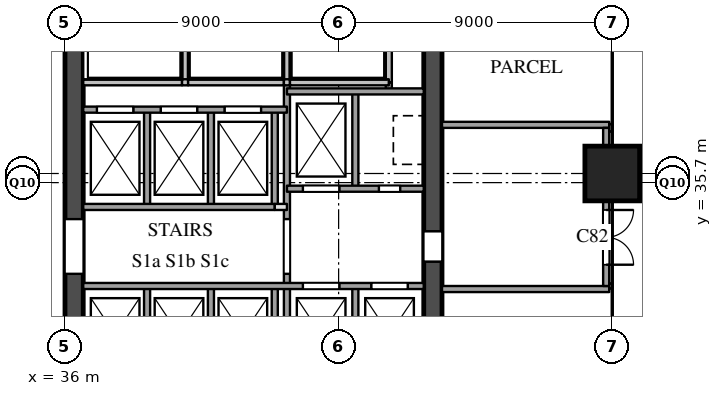
"""IFC4 building model, lengths in metres.
Left out: names, types, materials, properties, quantities, classifications, styles, units other than length and angle.
Written with IfcOpenShell. Run it as: python <this file> out.ifc"""

import sys

from ifc_helpers import new_model, si_unit, direction, frame, frame_2d, origin, origin_2d, place, context, subcontext, project, spatial, rectangle, extrude, element, fill, save


model = new_model("IFC4")
c1 = context("Model", 3, precision=1e-05, world=origin(), true_north=direction((0.0, 1.0)))
c2 = subcontext(c1, "Body", "Model", "MODEL_VIEW")
j1 = project(units=[si_unit("LENGTHUNIT", "METRE"), si_unit("PLANEANGLEUNIT", "RADIAN")], contexts=[c1])
p1 = place(None, origin())
s1 = spatial("IfcSite", under=j1, at=p1, CompositionType="ELEMENT")
p2 = place(p1, origin())
s2 = spatial("IfcBuilding", under=s1, at=p2, CompositionType="ELEMENT")
p3 = place(p2, origin())
s3 = spatial("IfcBuildingStorey", under=s2, at=p3, CompositionType="ELEMENT", Elevation=0.0)
p4 = place(p3, frame((54.0, 36.0, 0.0), z_axis=(0.0, 0.0, 1.0), x_axis=(1.0, 0.0, 0.0)))
e1 = element("IfcColumn", 1, at=p4, inside=s3, PredefinedType="COLUMN", context=c2, shape_type="SweptSolid", body=[
    extrude(rectangle(XDim=1.8, YDim=1.8, at=origin_2d()), origin(), (0.0, 0.0, 1.0), 8.0),
])
p5 = place(p3, frame((36.3, 29.1, 0.0), z_axis=(0.0, 0.0, 1.0), x_axis=(0.0, 1.0, 0.0)))
e2 = element("IfcWall", 2, at=p5, inside=s3, PredefinedType="SHEAR", context=c2, shape_type="SweptSolid", body=[
    extrude(rectangle(XDim=20.3, YDim=0.6, at=frame_2d((10.15, 0.0))), origin(), (0.0, 0.0, 1.0), 7.59),
])
p6 = place(p5, frame((3.6, 0.0, 0.0)))
e3 = element("IfcOpeningElement", 3, at=p6, cuts=e2, PredefinedType="OPENING", context=c2, shape_type="SweptSolid", body=[
    extrude(rectangle(XDim=1.8, YDim=2.1, at=frame_2d((0.9, 1.05))), frame((0.0, 0.31, 0.0), z_axis=(0.0, -1.0, 0.0), x_axis=(1.0, 0.0, 0.0)), (0.0, 0.0, 1.0), 0.62),
])
p7 = place(p5, frame((16.15, 0.0, 0.0)))
e4 = element("IfcOpeningElement", 4, at=p7, cuts=e2, PredefinedType="OPENING", context=c2, shape_type="SweptSolid", body=[
    extrude(rectangle(XDim=1.8, YDim=2.4, at=frame_2d((0.9, 1.2))), frame((0.0, 0.31, 0.0), z_axis=(0.0, -1.0, 0.0), x_axis=(1.0, 0.0, 0.0)), (0.0, 0.0, 1.0), 0.62),
])
p8 = place(p5, frame((18.05, 0.0, 0.0)))
e5 = element("IfcOpeningElement", 5, at=p8, cuts=e2, PredefinedType="OPENING", context=c2, shape_type="SweptSolid", body=[
    extrude(rectangle(XDim=1.8, YDim=2.4, at=frame_2d((0.9, 1.2))), frame((0.0, 0.31, 0.0), z_axis=(0.0, -1.0, 0.0), x_axis=(1.0, 0.0, 0.0)), (0.0, 0.0, 1.0), 0.62),
])
p9 = place(p3, frame((48.1, 29.1, 0.0), z_axis=(0.0, 0.0, 1.0), x_axis=(0.0, 1.0, 0.0)))
e6 = element("IfcWall", 6, at=p9, inside=s3, PredefinedType="SHEAR", context=c2, shape_type="SweptSolid", body=[
    extrude(rectangle(XDim=20.3, YDim=0.6, at=frame_2d((10.15, 0.0))), origin(), (0.0, 0.0, 1.0), 7.59),
])
p10 = place(p9, frame((12.5, 0.0, 0.0)))
e7 = element("IfcOpeningElement", 7, at=p10, cuts=e6, PredefinedType="OPENING", context=c2, shape_type="SweptSolid", body=[
    extrude(rectangle(XDim=0.7, YDim=2.1, at=frame_2d((0.35, 1.05))), frame((0.0, 0.31, 0.0), z_axis=(0.0, -1.0, 0.0), x_axis=(1.0, 0.0, 0.0)), (0.0, 0.0, 1.0), 0.62),
])
p11 = place(p9, frame((4.0, 0.0, 0.0)))
e8 = element("IfcOpeningElement", 8, at=p11, cuts=e6, PredefinedType="OPENING", context=c2, shape_type="SweptSolid", body=[
    extrude(rectangle(XDim=1.0, YDim=2.1, at=frame_2d((0.5, 1.05))), frame((0.0, 0.31, 0.0), z_axis=(0.0, -1.0, 0.0), x_axis=(1.0, 0.0, 0.0)), (0.0, 0.0, 1.0), 0.62),
])
p12 = place(p3, frame((38.7, 29.1, 0.0), z_axis=(0.0, 0.0, 1.0), x_axis=(0.0, 1.0, 0.0)))
e9 = element("IfcWall", 9, at=p12, inside=s3, PredefinedType="SOLIDWALL", context=c2, shape_type="SweptSolid", body=[
    extrude(rectangle(XDim=3.2, YDim=0.2, at=frame_2d((1.6, 0.0))), origin(), (0.0, 0.0, 1.0), 7.59),
])
p13 = place(p3, frame((38.7, 34.9, 0.0), z_axis=(0.0, 0.0, 1.0), x_axis=(0.0, 1.0, 0.0)))
e10 = element("IfcWall", 10, at=p13, inside=s3, PredefinedType="SOLIDWALL", context=c2, shape_type="SweptSolid", body=[
    extrude(rectangle(XDim=3.2, YDim=0.2, at=frame_2d((1.6, 0.0))), origin(), (0.0, 0.0, 1.0), 7.59),
])
p14 = place(p3, frame((39.95, 39.0, 0.0), z_axis=(0.0, 0.0, 1.0), x_axis=(0.0, 1.0, 0.0)))
e11 = element("IfcWall", 11, at=p14, inside=s3, PredefinedType="SOLIDWALL", context=c2, shape_type="SweptSolid", body=[
    extrude(rectangle(XDim=2.06, YDim=0.2, at=frame_2d((1.03, 0.0))), origin(), (0.0, 0.0, 1.0), 7.59),
])
p15 = place(p3, frame((40.8, 29.1, 0.0), z_axis=(0.0, 0.0, 1.0), x_axis=(0.0, 1.0, 0.0)))
e12 = element("IfcWall", 12, at=p15, inside=s3, PredefinedType="SOLIDWALL", context=c2, shape_type="SweptSolid", body=[
    extrude(rectangle(XDim=3.2, YDim=0.2, at=frame_2d((1.6, 0.0))), origin(), (0.0, 0.0, 1.0), 7.59),
])
p16 = place(p3, frame((40.8, 34.9, 0.0), z_axis=(0.0, 0.0, 1.0), x_axis=(0.0, 1.0, 0.0)))
e13 = element("IfcWall", 13, at=p16, inside=s3, PredefinedType="SOLIDWALL", context=c2, shape_type="SweptSolid", body=[
    extrude(rectangle(XDim=3.2, YDim=0.2, at=frame_2d((1.6, 0.0))), origin(), (0.0, 0.0, 1.0), 7.59),
])
p17 = place(p3, frame((42.9, 29.1, 0.0), z_axis=(0.0, 0.0, 1.0), x_axis=(0.0, 1.0, 0.0)))
e14 = element("IfcWall", 14, at=p17, inside=s3, PredefinedType="SOLIDWALL", context=c2, shape_type="SweptSolid", body=[
    extrude(rectangle(XDim=3.2, YDim=0.2, at=frame_2d((1.6, 0.0))), origin(), (0.0, 0.0, 1.0), 7.59),
])
p18 = place(p3, frame((42.9, 34.9, 0.0), z_axis=(0.0, 0.0, 1.0), x_axis=(0.0, 1.0, 0.0)))
e15 = element("IfcWall", 15, at=p18, inside=s3, PredefinedType="SOLIDWALL", context=c2, shape_type="SweptSolid", body=[
    extrude(rectangle(XDim=3.2, YDim=0.2, at=frame_2d((1.6, 0.0))), origin(), (0.0, 0.0, 1.0), 7.59),
])
p19 = place(p3, frame((43.3, 29.1, 0.0), z_axis=(0.0, 0.0, 1.0), x_axis=(0.0, 1.0, 0.0)))
e16 = element("IfcWall", 16, at=p19, inside=s3, PredefinedType="SOLIDWALL", context=c2, shape_type="SweptSolid", body=[
    extrude(rectangle(XDim=9.9, YDim=0.2, at=frame_2d((4.95, 0.0))), origin(), (0.0, 0.0, 1.0), 7.59),
])
p20 = place(p19, frame((3.6, 0.0, 0.0)))
e17 = element("IfcOpeningElement", 17, at=p20, cuts=e16, PredefinedType="OPENING", context=c2, shape_type="SweptSolid", body=[
    extrude(rectangle(XDim=1.8, YDim=2.1, at=frame_2d((0.9, 1.05))), frame((0.0, 0.11, 0.0), z_axis=(0.0, -1.0, 0.0), x_axis=(1.0, 0.0, 0.0)), (0.0, 0.0, 1.0), 0.22),
])
p21 = place(p3, frame((43.3, 39.0, 0.0), z_axis=(0.0, 0.0, 1.0), x_axis=(0.0, 1.0, 0.0)))
e18 = element("IfcWall", 18, at=p21, inside=s3, PredefinedType="SOLIDWALL", context=c2, shape_type="SweptSolid", body=[
    extrude(rectangle(XDim=2.06, YDim=0.2, at=frame_2d((1.03, 0.0))), origin(), (0.0, 0.0, 1.0), 7.59),
])
for number, where, z_axis, x_axis in (
    (19, (45.55, 29.1, 0.0), (0.0, 0.0, 1.0), (0.0, 1.0, 0.0)),
    (20, (45.55, 35.5, 0.0), (0.0, 0.0, 1.0), (0.0, 1.0, 0.0)),
):
    element("IfcWall", number, at=place(p3, frame(where, z_axis=z_axis, x_axis=x_axis)), inside=s3, PredefinedType="SOLIDWALL", context=c2, shape_type="SweptSolid", body=[
        extrude(rectangle(XDim=3.2, YDim=0.2, at=frame_2d((1.6, 0.0))), origin(), (0.0, 0.0, 1.0), 7.59),
    ])
p22 = place(p3, frame((46.65, 38.7, 0.0), z_axis=(0.0, 0.0, 1.0), x_axis=(0.0, 1.0, 0.0)))
e21 = element("IfcWall", 21, at=p22, inside=s3, PredefinedType="SOLIDWALL", context=c2, shape_type="SweptSolid", body=[
    extrude(rectangle(XDim=0.3, YDim=0.2, at=frame_2d((0.15, 0.0))), origin(), (0.0, 0.0, 1.0), 7.59),
])
p23 = place(p3, frame((46.65, 39.0, 0.0), z_axis=(0.0, 0.0, 1.0), x_axis=(0.0, 1.0, 0.0)))
e22 = element("IfcWall", 22, at=p23, inside=s3, PredefinedType="SOLIDWALL", context=c2, shape_type="SweptSolid", body=[
    extrude(rectangle(XDim=2.06, YDim=0.2, at=frame_2d((1.03, 0.0))), origin(), (0.0, 0.0, 1.0), 7.59),
])
p24 = place(p3, frame((36.6, 32.3, 0.0), z_axis=(0.0, 0.0, 1.0), x_axis=(1.0, 0.0, 0.0)))
e23 = element("IfcWall", 23, at=p24, inside=s3, PredefinedType="SOLIDWALL", context=c2, shape_type="SweptSolid", body=[
    extrude(rectangle(XDim=11.2, YDim=0.2, at=frame_2d((5.6, 0.0))), origin(), (0.0, 0.0, 1.0), 7.59),
])
p25 = place(p24, frame((7.225, 0.0, 0.0)))
e24 = element("IfcOpeningElement", 24, at=p25, cuts=e23, PredefinedType="OPENING", context=c2, shape_type="SweptSolid", body=[
    extrude(rectangle(XDim=1.2, YDim=2.1, at=frame_2d((0.6, 1.05))), frame((0.0, 0.11, 0.0), z_axis=(0.0, -1.0, 0.0), x_axis=(1.0, 0.0, 0.0)), (0.0, 0.0, 1.0), 0.22),
])
p26 = place(p24, frame((9.475, 0.0, 0.0)))
e25 = element("IfcOpeningElement", 25, at=p26, cuts=e23, PredefinedType="OPENING", context=c2, shape_type="SweptSolid", body=[
    extrude(rectangle(XDim=1.2, YDim=2.1, at=frame_2d((0.6, 1.05))), frame((0.0, 0.11, 0.0), z_axis=(0.0, -1.0, 0.0), x_axis=(1.0, 0.0, 0.0)), (0.0, 0.0, 1.0), 0.22),
])
p27 = place(p3, frame((42.9, 34.9, 0.0), z_axis=(0.0, 0.0, 1.0), x_axis=(1.0, 0.0, 0.0)))
e26 = element("IfcWall", 26, at=p27, inside=s3, PredefinedType="PARTITIONING", context=c2, shape_type="SweptSolid", body=[
    extrude(rectangle(XDim=0.4, YDim=0.2, at=frame_2d((0.2, 0.0))), origin(), (0.0, 0.0, 1.0), 7.59),
])
p28 = place(p3, frame((36.6, 34.9, 0.0), z_axis=(0.0, 0.0, 1.0), x_axis=(1.0, 0.0, 0.0)))
e27 = element("IfcWall", 27, at=p28, inside=s3, PredefinedType="SOLIDWALL", context=c2, shape_type="SweptSolid", body=[
    extrude(rectangle(XDim=6.3, YDim=0.2, at=frame_2d((3.15, 0.0))), origin(), (0.0, 0.0, 1.0), 7.59),
])
p29 = place(p3, frame((43.3, 35.5, 0.0), z_axis=(0.0, 0.0, 1.0), x_axis=(1.0, 0.0, 0.0)))
e28 = element("IfcWall", 28, at=p29, inside=s3, PredefinedType="SOLIDWALL", context=c2, shape_type="SweptSolid", body=[
    extrude(rectangle(XDim=4.5, YDim=0.2, at=frame_2d((2.25, 0.0))), origin(), (0.0, 0.0, 1.0), 7.59),
])
p30 = place(p29, frame((0.525, 0.0, 0.0)))
e29 = element("IfcOpeningElement", 29, at=p30, cuts=e28, PredefinedType="OPENING", context=c2, shape_type="SweptSolid", body=[
    extrude(rectangle(XDim=1.2, YDim=2.1, at=frame_2d((0.6, 1.05))), frame((0.0, 0.11, 0.0), z_axis=(0.0, -1.0, 0.0), x_axis=(1.0, 0.0, 0.0)), (0.0, 0.0, 1.0), 0.22),
])
p31 = place(p29, frame((3.025, 0.0, 0.0)))
e30 = element("IfcOpeningElement", 30, at=p31, cuts=e28, PredefinedType="OPENING", context=c2, shape_type="SweptSolid", body=[
    extrude(rectangle(XDim=0.7, YDim=2.1, at=frame_2d((0.35, 1.05))), frame((0.0, 0.11, 0.0), z_axis=(0.0, -1.0, 0.0), x_axis=(1.0, 0.0, 0.0)), (0.0, 0.0, 1.0), 0.22),
])
p32 = place(p3, frame((36.6, 38.1, 0.0), z_axis=(0.0, 0.0, 1.0), x_axis=(1.0, 0.0, 0.0)))
e31 = element("IfcWall", 31, at=p32, inside=s3, PredefinedType="SOLIDWALL", context=c2, shape_type="SweptSolid", body=[
    extrude(rectangle(XDim=6.7, YDim=0.2, at=frame_2d((3.35, 0.0))), origin(), (0.0, 0.0, 1.0), 7.59),
])
p33 = place(p32, frame((0.45, 0.0, 0.0)))
e32 = element("IfcOpeningElement", 32, at=p33, cuts=e31, PredefinedType="OPENING", context=c2, shape_type="SweptSolid", body=[
    extrude(rectangle(XDim=1.2, YDim=2.1, at=frame_2d((0.6, 1.05))), frame((0.0, 0.11, 0.0), z_axis=(0.0, -1.0, 0.0), x_axis=(1.0, 0.0, 0.0)), (0.0, 0.0, 1.0), 0.22),
])
p34 = place(p32, frame((2.55, 0.0, 0.0)))
e33 = element("IfcOpeningElement", 33, at=p34, cuts=e31, PredefinedType="OPENING", context=c2, shape_type="SweptSolid", body=[
    extrude(rectangle(XDim=1.2, YDim=2.1, at=frame_2d((0.6, 1.05))), frame((0.0, 0.11, 0.0), z_axis=(0.0, -1.0, 0.0), x_axis=(1.0, 0.0, 0.0)), (0.0, 0.0, 1.0), 0.22),
])
p35 = place(p32, frame((4.65, 0.0, 0.0)))
e34 = element("IfcOpeningElement", 34, at=p35, cuts=e31, PredefinedType="OPENING", context=c2, shape_type="SweptSolid", body=[
    extrude(rectangle(XDim=1.2, YDim=2.1, at=frame_2d((0.6, 1.05))), frame((0.0, 0.11, 0.0), z_axis=(0.0, -1.0, 0.0), x_axis=(1.0, 0.0, 0.0)), (0.0, 0.0, 1.0), 0.22),
])
p36 = place(p3, frame((43.3, 38.7, 0.0), z_axis=(0.0, 0.0, 1.0), x_axis=(1.0, 0.0, 0.0)))
e35 = element("IfcWall", 35, at=p36, inside=s3, PredefinedType="SOLIDWALL", context=c2, shape_type="SweptSolid", body=[
    extrude(rectangle(XDim=4.5, YDim=0.2, at=frame_2d((2.25, 0.0))), origin(), (0.0, 0.0, 1.0), 7.59),
])
p37 = place(p3, frame((36.6, 39.0, 0.0), z_axis=(0.0, 0.0, 1.0), x_axis=(1.0, 0.0, 0.0)))
e36 = element("IfcWall", 36, at=p37, inside=s3, PredefinedType="SOLIDWALL", context=c2, shape_type="SweptSolid", body=[
    extrude(rectangle(XDim=3.25, YDim=0.2, at=frame_2d((1.625, 0.0))), origin(), (0.0, 0.0, 1.0), 7.59),
])
p38 = place(p3, frame((39.85, 39.0, 0.0), z_axis=(0.0, 0.0, 1.0), x_axis=(1.0, 0.0, 0.0)))
e37 = element("IfcWall", 37, at=p38, inside=s3, PredefinedType="SOLIDWALL", context=c2, shape_type="SweptSolid", body=[
    extrude(rectangle(XDim=0.2, YDim=0.2, at=frame_2d((0.1, 0.0))), origin(), (0.0, 0.0, 1.0), 7.59),
])
p39 = place(p3, frame((40.05, 39.0, 0.0), z_axis=(0.0, 0.0, 1.0), x_axis=(1.0, 0.0, 0.0)))
e38 = element("IfcWall", 38, at=p39, inside=s3, PredefinedType="SOLIDWALL", context=c2, shape_type="SweptSolid", body=[
    extrude(rectangle(XDim=3.15, YDim=0.2, at=frame_2d((1.575, 0.0))), origin(), (0.0, 0.0, 1.0), 7.59),
])
p40 = place(p3, frame((43.2, 39.0, 0.0), z_axis=(0.0, 0.0, 1.0), x_axis=(1.0, 0.0, 0.0)))
e39 = element("IfcWall", 39, at=p40, inside=s3, PredefinedType="SOLIDWALL", context=c2, shape_type="SweptSolid", body=[
    extrude(rectangle(XDim=0.2, YDim=0.2, at=frame_2d((0.1, 0.0))), origin(), (0.0, 0.0, 1.0), 7.59),
])
p41 = place(p3, frame((43.4, 39.0, 0.0), z_axis=(0.0, 0.0, 1.0), x_axis=(1.0, 0.0, 0.0)))
e40 = element("IfcWall", 40, at=p41, inside=s3, PredefinedType="SOLIDWALL", context=c2, shape_type="SweptSolid", body=[
    extrude(rectangle(XDim=3.25, YDim=0.2, at=frame_2d((1.625, 0.0))), origin(), (0.0, 0.0, 1.0), 7.59),
])
for number, where, z_axis, x_axis in (
    (41, (48.4, 32.2, 0.0), (0.0, 0.0, 1.0), (1.0, 0.0, 0.0)),
    (42, (48.4, 37.6, 0.0), (0.0, 0.0, 1.0), (1.0, 0.0, 0.0)),
):
    element("IfcWall", number, at=place(p3, frame(where, z_axis=z_axis, x_axis=x_axis)), inside=s3, PredefinedType="SOLIDWALL", context=c2, shape_type="SweptSolid", body=[
        extrude(rectangle(XDim=5.5, YDim=0.2, at=frame_2d((2.75, 0.0))), origin(), (0.0, 0.0, 1.0), 7.59),
    ])
p42 = place(p3, frame((53.8, 32.3, 0.0), z_axis=(0.0, 0.0, 1.0), x_axis=(0.0, 1.0, 0.0)))
e43 = element("IfcWall", 43, at=p42, inside=s3, PredefinedType="SOLIDWALL", context=c2, shape_type="SweptSolid", body=[
    extrude(rectangle(XDim=5.2, YDim=0.2, at=frame_2d((2.6, 0.0))), origin(), (0.0, 0.0, 1.0), 6.59),
])
p43 = place(p42, frame((2.5, 0.0, 0.0), z_axis=(0.0, 0.0, 1.0), x_axis=(-1.0, 0.0, 0.0)))
e44 = element("IfcOpeningElement", 44, at=p43, cuts=e43, PredefinedType="OPENING", context=c2, shape_type="SweptSolid", body=[
    extrude(rectangle(XDim=1.8, YDim=2.4, at=frame_2d((0.9, 1.2))), frame((0.0, 0.11, 0.0), z_axis=(0.0, -1.0, 0.0), x_axis=(1.0, 0.0, 0.0)), (0.0, 0.0, 1.0), 0.22),
])
p44 = place(p3, frame((53.9, 32.3, 0.0), z_axis=(0.0, 0.0, 1.0), x_axis=(1.0, 0.0, 0.0)))
e45 = element("IfcWall", 45, at=p44, inside=s3, PredefinedType="PARTITIONING", context=c2, shape_type="SweptSolid", body=[
    extrude(rectangle(XDim=0.1, YDim=0.175, at=frame_2d((0.05, 0.0))), origin(), (0.0, 0.0, 1.0), 6.59),
])
p45 = place(p3, frame((53.9, 37.5, 0.0), z_axis=(0.0, 0.0, 1.0), x_axis=(1.0, 0.0, 0.0)))
e46 = element("IfcWall", 46, at=p45, inside=s3, PredefinedType="PARTITIONING", context=c2, shape_type="SweptSolid", body=[
    extrude(rectangle(XDim=0.1, YDim=0.25, at=frame_2d((0.05, 0.0))), origin(), (0.0, 0.0, 1.0), 6.59),
])
p46 = place(p33, origin())
e47 = element("IfcDoor", 47, at=p46, inside=s3, OperationType="SLIDING_TO_LEFT", PredefinedType="DOOR", context=c2, shape_type="SweptSolid", body=[
    extrude(rectangle(XDim=1.2, YDim=2.1, at=frame_2d((0.6, 1.05))), frame((0.0, 0.025, 0.0), z_axis=(0.0, -1.0, 0.0), x_axis=(1.0, 0.0, 0.0)), (0.0, 0.0, 1.0), 0.05),
])
fill(e32, e47)
p47 = place(p34, origin())
e48 = element("IfcDoor", 48, at=p47, inside=s3, OperationType="SLIDING_TO_LEFT", PredefinedType="DOOR", context=c2, shape_type="SweptSolid", body=[
    extrude(rectangle(XDim=1.2, YDim=2.1, at=frame_2d((0.6, 1.05))), frame((0.0, 0.025, 0.0), z_axis=(0.0, -1.0, 0.0), x_axis=(1.0, 0.0, 0.0)), (0.0, 0.0, 1.0), 0.05),
])
fill(e33, e48)
p48 = place(p35, origin())
e49 = element("IfcDoor", 49, at=p48, inside=s3, OperationType="SLIDING_TO_LEFT", PredefinedType="DOOR", context=c2, shape_type="SweptSolid", body=[
    extrude(rectangle(XDim=1.2, YDim=2.1, at=frame_2d((0.6, 1.05))), frame((0.0, 0.025, 0.0), z_axis=(0.0, -1.0, 0.0), x_axis=(1.0, 0.0, 0.0)), (0.0, 0.0, 1.0), 0.05),
])
fill(e34, e49)
p49 = place(p25, origin())
e50 = element("IfcDoor", 50, at=p49, inside=s3, OperationType="SLIDING_TO_LEFT", PredefinedType="DOOR", context=c2, shape_type="SweptSolid", body=[
    extrude(rectangle(XDim=1.2, YDim=2.1, at=frame_2d((0.6, 1.05))), frame((0.0, 0.025, 0.0), z_axis=(0.0, -1.0, 0.0), x_axis=(1.0, 0.0, 0.0)), (0.0, 0.0, 1.0), 0.05),
])
fill(e24, e50)
p50 = place(p26, origin())
e51 = element("IfcDoor", 51, at=p50, inside=s3, OperationType="SLIDING_TO_LEFT", PredefinedType="DOOR", context=c2, shape_type="SweptSolid", body=[
    extrude(rectangle(XDim=1.2, YDim=2.1, at=frame_2d((0.6, 1.05))), frame((0.0, 0.025, 0.0), z_axis=(0.0, -1.0, 0.0), x_axis=(1.0, 0.0, 0.0)), (0.0, 0.0, 1.0), 0.05),
])
fill(e25, e51)
p51 = place(p30, origin())
e52 = element("IfcDoor", 52, at=p51, inside=s3, OperationType="SLIDING_TO_LEFT", PredefinedType="DOOR", context=c2, shape_type="SweptSolid", body=[
    extrude(rectangle(XDim=1.2, YDim=2.1, at=frame_2d((0.6, 1.05))), frame((0.0, 0.025, 0.0), z_axis=(0.0, -1.0, 0.0), x_axis=(1.0, 0.0, 0.0)), (0.0, 0.0, 1.0), 0.05),
])
fill(e29, e52)
p52 = place(p6, origin())
e53 = element("IfcDoor", 53, at=p52, inside=s3, OperationType="DOUBLE_DOOR_SINGLE_SWING", PredefinedType="DOOR", context=c2, shape_type="SweptSolid", body=[
    extrude(rectangle(XDim=1.8, YDim=2.1, at=frame_2d((0.9, 1.05))), frame((0.0, 0.025, 0.0), z_axis=(0.0, -1.0, 0.0), x_axis=(1.0, 0.0, 0.0)), (0.0, 0.0, 1.0), 0.05),
])
fill(e3, e53)
p53 = place(p20, origin())
e54 = element("IfcDoor", 54, at=p53, inside=s3, OperationType="DOUBLE_DOOR_SINGLE_SWING", PredefinedType="DOOR", context=c2, shape_type="SweptSolid", body=[
    extrude(rectangle(XDim=1.8, YDim=2.1, at=frame_2d((0.9, 1.05))), frame((0.0, 0.025, 0.0), z_axis=(0.0, -1.0, 0.0), x_axis=(1.0, 0.0, 0.0)), (0.0, 0.0, 1.0), 0.05),
])
fill(e17, e54)
p54 = place(p31, origin())
e55 = element("IfcDoor", 55, at=p54, inside=s3, OperationType="SINGLE_SWING_RIGHT", PredefinedType="DOOR", context=c2, shape_type="SweptSolid", body=[
    extrude(rectangle(XDim=0.7, YDim=2.1, at=frame_2d((0.35, 1.05))), frame((0.0, 0.025, 0.0), z_axis=(0.0, -1.0, 0.0), x_axis=(1.0, 0.0, 0.0)), (0.0, 0.0, 1.0), 0.05),
])
fill(e30, e55)
p55 = place(p11, origin())
e56 = element("IfcDoor", 56, at=p55, inside=s3, OperationType="SINGLE_SWING_LEFT", PredefinedType="DOOR", context=c2, shape_type="SweptSolid", body=[
    extrude(rectangle(XDim=1.0, YDim=2.1, at=frame_2d((0.5, 1.05))), frame((0.0, 0.025, 0.0), z_axis=(0.0, -1.0, 0.0), x_axis=(1.0, 0.0, 0.0)), (0.0, 0.0, 1.0), 0.05),
])
fill(e8, e56)
p56 = place(p43, origin())
e57 = element("IfcDoor", 57, at=p56, inside=s3, OperationType="DOUBLE_DOOR_SINGLE_SWING", PredefinedType="DOOR", context=c2, shape_type="SweptSolid", body=[
    extrude(rectangle(XDim=1.8, YDim=2.4, at=frame_2d((0.9, 1.2))), frame((0.0, 0.025, 0.0), z_axis=(0.0, -1.0, 0.0), x_axis=(1.0, 0.0, 0.0)), (0.0, 0.0, 1.0), 0.05),
])
fill(e44, e57)
save(model, sys.argv[1])
